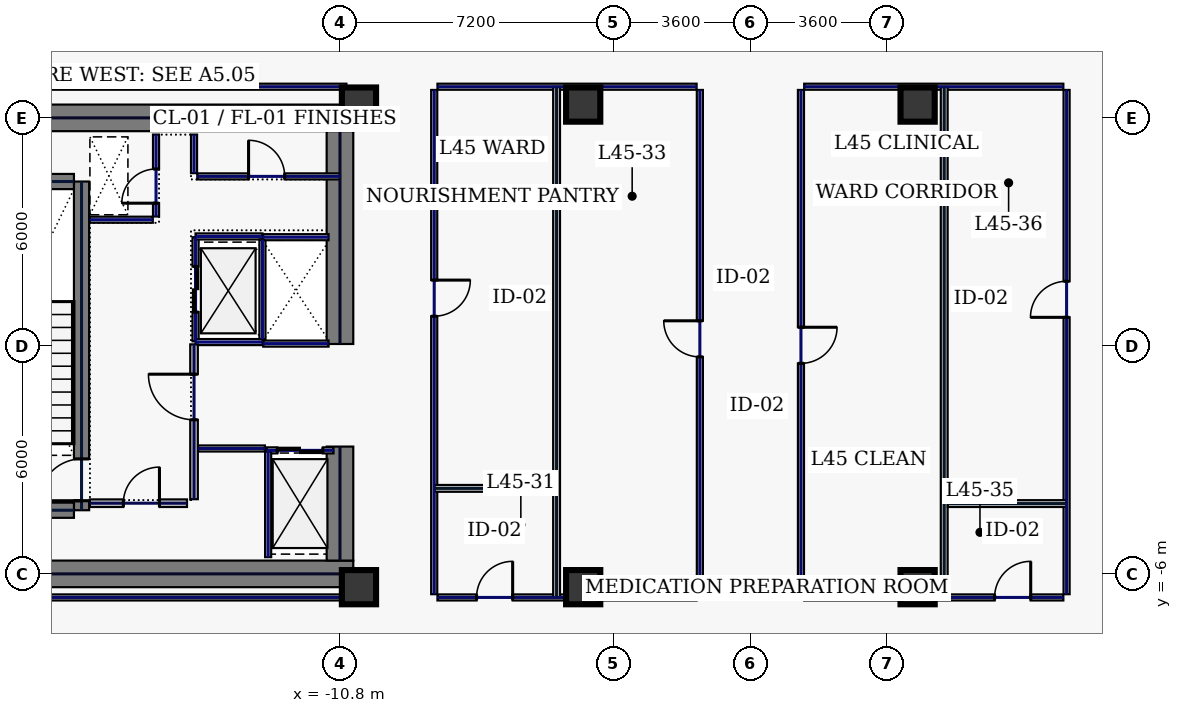
"""IFC4 building model, lengths in metres.
Left out: names, types, materials, properties, quantities, classifications, styles, units other than length and angle.
Written with IfcOpenShell. Run it as: python <this file> out.ifc"""

import sys

from ifc_helpers import new_model, si_unit, direction, frame, frame_2d, origin, origin_2d, place, context, subcontext, project, spatial, rectangle, hollow_rectangle, extrude, element, fill, save


model = new_model("IFC4")
c1 = context("Model", 3, precision=1e-05, world=origin(), true_north=direction((0.0, 1.0)))
c2 = subcontext(c1, "Body", "Model", "MODEL_VIEW")
j1 = project(units=[si_unit("LENGTHUNIT", "METRE"), si_unit("PLANEANGLEUNIT", "RADIAN")], contexts=[c1])
p1 = place(None, origin())
s1 = spatial("IfcSite", under=j1, at=p1, CompositionType="ELEMENT")
p2 = place(p1, origin())
s2 = spatial("IfcBuilding", under=s1, at=p2, CompositionType="ELEMENT")
p3 = place(p2, frame((0.0, 0.0, 196.2)))
s3 = spatial("IfcBuildingStorey", under=s2, at=p3, CompositionType="ELEMENT", Elevation=196.2)
for number, where, z_axis, x_axis in (
    (1, (-22.0, 6.0, 0.0), (0.0, 0.0, 1.0), (1.0, 0.0, 0.0)),
    (2, (-22.0, -6.0, 0.0), (0.0, 0.0, 1.0), (1.0, 0.0, 0.0)),
):
    element("IfcWall", number, at=place(p3, frame(where, z_axis=z_axis, x_axis=x_axis)), inside=s3, PredefinedType="SHEAR", context=c2, shape_type="SweptSolid", body=[
        extrude(rectangle(XDim=11.55, YDim=0.7, at=frame_2d((5.775, 0.0))), origin(), (0.0, 0.0, 1.0), 3.74),
    ])
p4 = place(p3, frame((-10.8, -5.65, 0.0), z_axis=(0.0, 0.0, 1.0), x_axis=(0.0, 1.0, 0.0)))
e3 = element("IfcWall", 3, at=p4, inside=s3, PredefinedType="SHEAR", context=c2, shape_type="SweptSolid", body=[
    extrude(rectangle(XDim=3.0, YDim=0.7, at=frame_2d((1.5, 0.0))), origin(), (0.0, 0.0, 1.0), 3.74),
])
p5 = place(p3, frame((-10.8, 0.05, 0.0), z_axis=(0.0, 0.0, 1.0), x_axis=(0.0, 1.0, 0.0)))
e4 = element("IfcWall", 4, at=p5, inside=s3, PredefinedType="SHEAR", context=c2, shape_type="SweptSolid", body=[
    extrude(rectangle(XDim=5.6, YDim=0.7, at=frame_2d((2.8, 0.0))), origin(), (0.0, 0.0, 1.0), 3.74),
])
p6 = place(p3, frame((-17.6, -4.325, 0.0), z_axis=(0.0, 0.0, 1.0), x_axis=(0.0, 1.0, 0.0)))
e5 = element("IfcWall", 5, at=p6, inside=s3, PredefinedType="SHEAR", context=c2, shape_type="SweptSolid", body=[
    extrude(rectangle(XDim=8.65, YDim=0.4, at=frame_2d((4.325, 0.0))), origin(), (0.0, 0.0, 1.0), 3.74),
])
p7 = place(p6, frame((0.25, 0.0, 0.0)))
e6 = element("IfcOpeningElement", 6, at=p7, cuts=e5, PredefinedType="OPENING", context=c2, shape_type="SweptSolid", body=[
    extrude(rectangle(XDim=1.1, YDim=2.2, at=frame_2d((0.55, 1.1))), frame((0.0, 0.21, 0.0), z_axis=(0.0, -1.0, 0.0), x_axis=(1.0, 0.0, 0.0)), (0.0, 0.0, 1.0), 0.42),
])
for number, where, z_axis, x_axis in (
    (7, (-21.2, -4.325, 0.0), (0.0, 0.0, 1.0), (1.0, 0.0, 0.0)),
    (8, (-21.2, 4.325, 0.0), (0.0, 0.0, 1.0), (1.0, 0.0, 0.0)),
):
    element("IfcWall", number, at=place(p3, frame(where, z_axis=z_axis, x_axis=x_axis)), inside=s3, PredefinedType="SHEAR", context=c2, shape_type="SweptSolid", body=[
        extrude(rectangle(XDim=3.4, YDim=0.4, at=frame_2d((1.7, 0.0))), origin(), (0.0, 0.0, 1.0), 3.74),
    ])
for number, where, z_axis, x_axis in (
    (9, (-10.3, -6.35, 0.0), (0.0, 0.0, 1.0), (1.0, 0.0, 0.0)),
    (10, (-10.3, 6.35, 0.0), (0.0, 0.0, 1.0), (1.0, 0.0, 0.0)),
    (11, (-4.4, -6.35, 0.0), (0.0, 0.0, 1.0), (1.0, 0.0, 0.0)),
    (12, (4.4, -6.35, 0.0), (0.0, 0.0, 1.0), (1.0, 0.0, 0.0)),
    (13, (-4.4, 6.35, 0.0), (0.0, 0.0, 1.0), (1.0, 0.0, 0.0)),
    (14, (4.4, 6.35, 0.0), (0.0, 0.0, 1.0), (1.0, 0.0, 0.0)),
):
    element("IfcColumn", number, at=place(p3, frame(where, z_axis=z_axis, x_axis=x_axis)), inside=s3, PredefinedType="COLUMN", context=c2, shape_type="SweptSolid", body=[
        extrude(hollow_rectangle(XDim=0.9, YDim=0.9, WallThickness=0.04, at=origin_2d()), origin(), (0.0, 0.0, 1.0), 3.74),
    ])
p8 = place(p3, frame((-14.6, 0.12, 0.0), z_axis=(0.0, 0.0, 1.0), x_axis=(0.0, 1.0, 0.0)))
e15 = element("IfcWall", 15, at=p8, inside=s3, PredefinedType="PARTITIONING", context=c2, shape_type="SweptSolid", body=[
    extrude(rectangle(XDim=2.74, YDim=0.16, at=frame_2d((1.37, 0.0))), origin(), (0.0, 0.0, 1.0), 3.74),
])
p9 = place(p8, frame((0.77, 0.0, 0.0)))
e16 = element("IfcOpeningElement", 16, at=p9, cuts=e15, PredefinedType="OPENING", context=c2, shape_type="SweptSolid", body=[
    extrude(rectangle(XDim=1.2, YDim=2.2, at=frame_2d((0.6, 1.1))), frame((0.0, 0.09, 0.0), z_axis=(0.0, -1.0, 0.0), x_axis=(1.0, 0.0, 0.0)), (0.0, 0.0, 1.0), 0.18),
])
for number, where, z_axis, x_axis in (
    (17, (-14.6, 0.1, 0.0), (0.0, 0.0, 1.0), (1.0, 0.0, 0.0)),
    (18, (-14.6, 2.88, 0.0), (0.0, 0.0, 1.0), (1.0, 0.0, 0.0)),
):
    element("IfcWall", number, at=place(p3, frame(where, z_axis=z_axis, x_axis=x_axis)), inside=s3, PredefinedType="PARTITIONING", context=c2, shape_type="SweptSolid", body=[
        extrude(rectangle(XDim=1.76, YDim=0.16, at=frame_2d((0.88, 0.0))), origin(), (0.0, 0.0, 1.0), 3.74),
    ])
p10 = place(p3, frame((-12.84, 0.18, 0.0), z_axis=(0.0, 0.0, 1.0), x_axis=(0.0, 1.0, 0.0)))
e19 = element("IfcWall", 19, at=p10, inside=s3, PredefinedType="PARTITIONING", context=c2, shape_type="SweptSolid", body=[
    extrude(rectangle(XDim=2.62, YDim=0.16, at=frame_2d((1.31, 0.0))), origin(), (0.0, 0.0, 1.0), 3.74),
])
p11 = place(p3, frame((-12.73, -2.75, 0.0), z_axis=(0.0, 0.0, 1.0), x_axis=(1.0, 0.0, 0.0)))
e20 = element("IfcWall", 20, at=p11, inside=s3, PredefinedType="PARTITIONING", context=c2, shape_type="SweptSolid", body=[
    extrude(rectangle(XDim=1.76, YDim=0.16, at=frame_2d((0.88, 0.0))), origin(), (0.0, 0.0, 1.0), 3.74),
])
p12 = place(p11, frame((0.28, 0.0, 0.0)))
e21 = element("IfcOpeningElement", 21, at=p12, cuts=e20, PredefinedType="OPENING", context=c2, shape_type="SweptSolid", body=[
    extrude(rectangle(XDim=1.2, YDim=2.2, at=frame_2d((0.6, 1.1))), frame((0.0, 0.09, 0.0), z_axis=(0.0, -1.0, 0.0), x_axis=(1.0, 0.0, 0.0)), (0.0, 0.0, 1.0), 0.18),
])
for number, where, z_axis, x_axis in (
    (22, (-12.82, 0.06, 0.0), (0.0, 0.0, 1.0), (1.0, 0.0, 0.0)),
    (23, (-12.82, 2.86, 0.0), (0.0, 0.0, 1.0), (1.0, 0.0, 0.0)),
):
    element("IfcWall", number, at=place(p3, frame(where, z_axis=z_axis, x_axis=x_axis)), inside=s3, PredefinedType="PARTITIONING", context=c2, shape_type="SweptSolid", body=[
        extrude(rectangle(XDim=1.72, YDim=0.16, at=frame_2d((0.86, 0.0))), origin(), (0.0, 0.0, 1.0), 3.74),
    ])
p13 = place(p3, frame((-15.64, 3.405, 0.0), z_axis=(0.0, 0.0, 1.0), x_axis=(0.0, 1.0, 0.0)))
e24 = element("IfcWall", 24, at=p13, inside=s3, PredefinedType="PARTITIONING", context=c2, shape_type="SweptSolid", body=[
    extrude(rectangle(XDim=2.155, YDim=0.16, at=frame_2d((1.078, 0.0))), origin(), (0.0, 0.0, 1.0), 3.74),
])
p14 = place(p13, frame((0.35, 0.0, 0.0)))
e25 = element("IfcOpeningElement", 25, at=p14, cuts=e24, PredefinedType="OPENING", context=c2, shape_type="SweptSolid", body=[
    extrude(rectangle(XDim=0.9, YDim=2.2, at=frame_2d((0.45, 1.1))), frame((0.0, 0.09, 0.0), z_axis=(0.0, -1.0, 0.0), x_axis=(1.0, 0.0, 0.0)), (0.0, 0.0, 1.0), 0.18),
])
p15 = place(p3, frame((-17.38, 3.32, 0.0), z_axis=(0.0, 0.0, 1.0), x_axis=(1.0, 0.0, 0.0)))
e26 = element("IfcWall", 26, at=p15, inside=s3, PredefinedType="PARTITIONING", context=c2, shape_type="SweptSolid", body=[
    extrude(rectangle(XDim=1.655, YDim=0.16, at=frame_2d((0.827, 0.0))), origin(), (0.0, 0.0, 1.0), 3.74),
])
p16 = place(p3, frame((-17.38, -4.14, 0.0), z_axis=(0.0, 0.0, 1.0), x_axis=(1.0, 0.0, 0.0)))
e27 = element("IfcWall", 27, at=p16, inside=s3, PredefinedType="SOLIDWALL", context=c2, shape_type="SweptSolid", body=[
    extrude(rectangle(XDim=2.555, YDim=0.2, at=frame_2d((1.277, 0.0))), origin(), (0.0, 0.0, 1.0), 3.74),
])
p17 = place(p16, frame((0.88, 0.0, 0.0)))
e28 = element("IfcOpeningElement", 28, at=p17, cuts=e27, PredefinedType="OPENING", context=c2, shape_type="SweptSolid", body=[
    extrude(rectangle(XDim=0.95, YDim=2.2, at=frame_2d((0.475, 1.1))), frame((0.0, 0.11, 0.0), z_axis=(0.0, -1.0, 0.0), x_axis=(1.0, 0.0, 0.0)), (0.0, 0.0, 1.0), 0.22),
])
p18 = place(p3, frame((-14.535, -2.7, 0.0), z_axis=(0.0, 0.0, 1.0), x_axis=(1.0, 0.0, 0.0)))
e29 = element("IfcWall", 29, at=p18, inside=s3, PredefinedType="PARTITIONING", context=c2, shape_type="SweptSolid", body=[
    extrude(rectangle(XDim=1.76, YDim=0.16, at=frame_2d((0.88, 0.0))), origin(), (0.0, 0.0, 1.0), 3.74),
])
p19 = place(p3, frame((-12.69, -5.56, 0.0), z_axis=(0.0, 0.0, 1.0), x_axis=(0.0, 1.0, 0.0)))
e30 = element("IfcWall", 30, at=p19, inside=s3, PredefinedType="PARTITIONING", context=c2, shape_type="SweptSolid", body=[
    extrude(rectangle(XDim=2.775, YDim=0.16, at=frame_2d((1.388, 0.0))), origin(), (0.0, 0.0, 1.0), 3.74),
])
p20 = place(p3, frame((-14.555, 4.46, 0.0), z_axis=(0.0, 0.0, 1.0), x_axis=(1.0, 0.0, 0.0)))
e31 = element("IfcWall", 31, at=p20, inside=s3, PredefinedType="PARTITIONING", context=c2, shape_type="SweptSolid", body=[
    extrude(rectangle(XDim=3.755, YDim=0.16, at=frame_2d((1.877, 0.0))), origin(), (0.0, 0.0, 1.0), 3.74),
])
p21 = place(p20, frame((1.35, 0.0, 0.0)))
e32 = element("IfcOpeningElement", 32, at=p21, cuts=e31, PredefinedType="OPENING", context=c2, shape_type="SweptSolid", body=[
    extrude(rectangle(XDim=0.95, YDim=2.2, at=frame_2d((0.475, 1.1))), frame((0.0, 0.09, 0.0), z_axis=(0.0, -1.0, 0.0), x_axis=(1.0, 0.0, 0.0)), (0.0, 0.0, 1.0), 0.18),
])
p22 = place(p3, frame((-14.64, 4.545, 0.0), z_axis=(0.0, 0.0, 1.0), x_axis=(0.0, 1.0, 0.0)))
e33 = element("IfcWall", 33, at=p22, inside=s3, PredefinedType="PARTITIONING", context=c2, shape_type="SweptSolid", body=[
    extrude(rectangle(XDim=1.015, YDim=0.16, at=frame_2d((0.508, 0.0))), origin(), (0.0, 0.0, 1.0), 3.74),
])
p23 = place(p3, frame((-14.64, -4.035, 0.0), z_axis=(0.0, 0.0, 1.0), x_axis=(0.0, 1.0, 0.0)))
e34 = element("IfcWall", 34, at=p23, inside=s3, PredefinedType="SOLIDWALL", context=c2, shape_type="SweptSolid", body=[
    extrude(rectangle(XDim=4.075, YDim=0.2, at=frame_2d((2.038, 0.0))), origin(), (0.0, 0.0, 1.0), 3.74),
])
p24 = place(p23, frame((2.09, 0.0, 0.0)))
e35 = element("IfcOpeningElement", 35, at=p24, cuts=e34, PredefinedType="OPENING", context=c2, shape_type="SweptSolid", body=[
    extrude(rectangle(XDim=1.2, YDim=2.2, at=frame_2d((0.6, 1.1))), frame((0.0, 0.11, 0.0), z_axis=(0.0, -1.0, 0.0), x_axis=(1.0, 0.0, 0.0)), (0.0, 0.0, 1.0), 0.22),
])
for number, where, z_axis, x_axis in (
    (36, (-24.965, -6.62, 0.0), (0.0, 0.0, 1.0), (1.0, 0.0, 0.0)),
    (37, (-10.63, 6.82, 0.0), (0.0, 0.0, 1.0), (-1.0, 0.0, 0.0)),
):
    element("IfcWall", number, at=place(p3, frame(where, z_axis=z_axis, x_axis=x_axis)), inside=s3, PredefinedType="PARTITIONING", context=c2, shape_type="SweptSolid", body=[
        extrude(rectangle(XDim=14.335, YDim=0.16, at=frame_2d((7.167, 0.0))), origin(), (0.0, 0.0, 1.0), 3.74),
    ])
p25 = place(p3, frame((8.235, 6.82, 0.0), z_axis=(0.0, 0.0, 1.0), x_axis=(-1.0, 0.0, 0.0)))
e38 = element("IfcWall", 38, at=p25, inside=s3, PredefinedType="PARTITIONING", context=c2, shape_type="SweptSolid", body=[
    extrude(rectangle(XDim=6.82, YDim=0.16, at=frame_2d((3.41, 0.0))), origin(), (0.0, 0.0, 1.0), 3.74),
])
p26 = place(p3, frame((1.33, 6.735, 0.0), z_axis=(0.0, 0.0, 1.0), x_axis=(0.0, -1.0, 0.0)))
e39 = element("IfcWall", 39, at=p26, inside=s3, PredefinedType="PARTITIONING", context=c2, shape_type="SweptSolid", body=[
    extrude(rectangle(XDim=13.27, YDim=0.16, at=frame_2d((6.635, 0.0))), origin(), (0.0, 0.0, 1.0), 3.74),
])
p27 = place(p26, frame((6.245, 0.0, 0.0)))
e40 = element("IfcOpeningElement", 40, at=p27, cuts=e39, PredefinedType="OPENING", context=c2, shape_type="SweptSolid", body=[
    extrude(rectangle(XDim=0.95, YDim=2.2, at=frame_2d((0.475, 1.1))), frame((0.0, 0.09, 0.0), z_axis=(0.0, -1.0, 0.0), x_axis=(1.0, 0.0, 0.0)), (0.0, 0.0, 1.0), 0.18),
])
p28 = place(p3, frame((1.415, -6.62, 0.0), z_axis=(0.0, 0.0, 1.0), x_axis=(1.0, 0.0, 0.0)))
e41 = element("IfcWall", 41, at=p28, inside=s3, PredefinedType="PARTITIONING", context=c2, shape_type="SweptSolid", body=[
    extrude(rectangle(XDim=6.82, YDim=0.16, at=frame_2d((3.41, 0.0))), origin(), (0.0, 0.0, 1.0), 3.74),
])
p29 = place(p28, frame((5.011, 0.0, 0.0)))
e42 = element("IfcOpeningElement", 42, at=p29, cuts=e41, PredefinedType="OPENING", context=c2, shape_type="SweptSolid", body=[
    extrude(rectangle(XDim=0.95, YDim=2.2, at=frame_2d((0.475, 1.1))), frame((0.0, 0.09, 0.0), z_axis=(0.0, -1.0, 0.0), x_axis=(1.0, 0.0, 0.0)), (0.0, 0.0, 1.0), 0.18),
])
p30 = place(p3, frame((8.32, -6.535, 0.0), z_axis=(0.0, 0.0, 1.0), x_axis=(0.0, 1.0, 0.0)))
e43 = element("IfcWall", 43, at=p30, inside=s3, PredefinedType="PARTITIONING", context=c2, shape_type="SweptSolid", body=[
    extrude(rectangle(XDim=13.27, YDim=0.16, at=frame_2d((6.635, 0.0))), origin(), (0.0, 0.0, 1.0), 3.74),
])
p31 = place(p30, frame((7.286, 0.0, 0.0)))
e44 = element("IfcOpeningElement", 44, at=p31, cuts=e43, PredefinedType="OPENING", context=c2, shape_type="SweptSolid", body=[
    extrude(rectangle(XDim=0.95, YDim=2.2, at=frame_2d((0.475, 1.1))), frame((0.0, 0.09, 0.0), z_axis=(0.0, -1.0, 0.0), x_axis=(1.0, 0.0, 0.0)), (0.0, 0.0, 1.0), 0.18),
])
p32 = place(p3, frame((-1.33, -6.535, 0.0), z_axis=(0.0, 0.0, 1.0), x_axis=(0.0, 1.0, 0.0)))
e45 = element("IfcWall", 45, at=p32, inside=s3, PredefinedType="PARTITIONING", context=c2, shape_type="SweptSolid", body=[
    extrude(rectangle(XDim=13.27, YDim=0.16, at=frame_2d((6.635, 0.0))), origin(), (0.0, 0.0, 1.0), 3.74),
])
p33 = place(p32, frame((6.245, 0.0, 0.0)))
e46 = element("IfcOpeningElement", 46, at=p33, cuts=e45, PredefinedType="OPENING", context=c2, shape_type="SweptSolid", body=[
    extrude(rectangle(XDim=0.95, YDim=2.2, at=frame_2d((0.475, 1.1))), frame((0.0, 0.09, 0.0), z_axis=(0.0, -1.0, 0.0), x_axis=(1.0, 0.0, 0.0)), (0.0, 0.0, 1.0), 0.18),
])
p34 = place(p3, frame((-1.415, 6.82, 0.0), z_axis=(0.0, 0.0, 1.0), x_axis=(-1.0, 0.0, 0.0)))
e47 = element("IfcWall", 47, at=p34, inside=s3, PredefinedType="PARTITIONING", context=c2, shape_type="SweptSolid", body=[
    extrude(rectangle(XDim=6.82, YDim=0.16, at=frame_2d((3.41, 0.0))), origin(), (0.0, 0.0, 1.0), 3.74),
])
p35 = place(p3, frame((-8.32, 6.735, 0.0), z_axis=(0.0, 0.0, 1.0), x_axis=(0.0, -1.0, 0.0)))
e48 = element("IfcWall", 48, at=p35, inside=s3, PredefinedType="PARTITIONING", context=c2, shape_type="SweptSolid", body=[
    extrude(rectangle(XDim=13.27, YDim=0.16, at=frame_2d((6.635, 0.0))), origin(), (0.0, 0.0, 1.0), 3.74),
])
p36 = place(p35, frame((5.004, 0.0, 0.0)))
e49 = element("IfcOpeningElement", 49, at=p36, cuts=e48, PredefinedType="OPENING", context=c2, shape_type="SweptSolid", body=[
    extrude(rectangle(XDim=0.95, YDim=2.2, at=frame_2d((0.475, 1.1))), frame((0.0, 0.09, 0.0), z_axis=(0.0, -1.0, 0.0), x_axis=(1.0, 0.0, 0.0)), (0.0, 0.0, 1.0), 0.18),
])
p37 = place(p3, frame((-8.235, -6.62, 0.0), z_axis=(0.0, 0.0, 1.0), x_axis=(1.0, 0.0, 0.0)))
e50 = element("IfcWall", 50, at=p37, inside=s3, PredefinedType="PARTITIONING", context=c2, shape_type="SweptSolid", body=[
    extrude(rectangle(XDim=6.82, YDim=0.16, at=frame_2d((3.41, 0.0))), origin(), (0.0, 0.0, 1.0), 3.74),
])
p38 = place(p37, frame((1.029, 0.0, 0.0)))
e51 = element("IfcOpeningElement", 51, at=p38, cuts=e50, PredefinedType="OPENING", context=c2, shape_type="SweptSolid", body=[
    extrude(rectangle(XDim=0.95, YDim=2.2, at=frame_2d((0.475, 1.1))), frame((0.0, 0.09, 0.0), z_axis=(0.0, -1.0, 0.0), x_axis=(1.0, 0.0, 0.0)), (0.0, 0.0, 1.0), 0.18),
])
for number, where, z_axis, x_axis in (
    (52, (-5.1, -6.615, 0.0), (0.0, 0.0, 1.0), (0.0, 1.0, 0.0)),
    (53, (5.1, -6.615, 0.0), (0.0, 0.0, 1.0), (0.0, 1.0, 0.0)),
):
    element("IfcWall", number, at=place(p3, frame(where, z_axis=z_axis, x_axis=x_axis)), inside=s3, PredefinedType="PARTITIONING", context=c2, shape_type="SweptSolid", body=[
        extrude(rectangle(XDim=13.43, YDim=0.18, at=frame_2d((6.715, 0.0))), origin(), (0.0, 0.0, 1.0), 3.74),
    ])
for number, where, z_axis, x_axis in (
    (54, (-8.315, -3.75, 0.0), (0.0, 0.0, 1.0), (1.0, 0.0, 0.0)),
    (55, (5.195, -4.15, 0.0), (0.0, 0.0, 1.0), (1.0, 0.0, 0.0)),
):
    element("IfcWall", number, at=place(p3, frame(where, z_axis=z_axis, x_axis=x_axis)), inside=s3, PredefinedType="PARTITIONING", context=c2, shape_type="SweptSolid", body=[
        extrude(rectangle(XDim=3.12, YDim=0.18, at=frame_2d((1.56, 0.0))), origin(), (0.0, 0.0, 1.0), 3.74),
    ])
p39 = place(p7, origin())
e56 = element("IfcDoor", 56, at=p39, inside=s3, OperationType="SINGLE_SWING_LEFT", PredefinedType="DOOR", context=c2, shape_type="SweptSolid", body=[
    extrude(rectangle(XDim=1.1, YDim=2.2, at=frame_2d((0.55, 1.1))), frame((0.0, 0.025, 0.0), z_axis=(0.0, -1.0, 0.0), x_axis=(1.0, 0.0, 0.0)), (0.0, 0.0, 1.0), 0.05),
])
fill(e6, e56)
p40 = place(p9, origin())
e57 = element("IfcDoor", 57, at=p40, inside=s3, OperationType="SLIDING_TO_LEFT", PredefinedType="DOOR", context=c2, shape_type="SweptSolid", body=[
    extrude(rectangle(XDim=1.2, YDim=2.2, at=frame_2d((0.6, 1.1))), frame((0.0, 0.025, 0.0), z_axis=(0.0, -1.0, 0.0), x_axis=(1.0, 0.0, 0.0)), (0.0, 0.0, 1.0), 0.05),
])
fill(e16, e57)
p41 = place(p12, origin())
e58 = element("IfcDoor", 58, at=p41, inside=s3, OperationType="SLIDING_TO_LEFT", PredefinedType="DOOR", context=c2, shape_type="SweptSolid", body=[
    extrude(rectangle(XDim=1.2, YDim=2.2, at=frame_2d((0.6, 1.1))), frame((0.0, 0.025, 0.0), z_axis=(0.0, -1.0, 0.0), x_axis=(1.0, 0.0, 0.0)), (0.0, 0.0, 1.0), 0.05),
])
fill(e21, e58)
p42 = place(p14, origin())
e59 = element("IfcDoor", 59, at=p42, inside=s3, OperationType="SINGLE_SWING_LEFT", PredefinedType="DOOR", context=c2, shape_type="SweptSolid", body=[
    extrude(rectangle(XDim=0.9, YDim=2.2, at=frame_2d((0.45, 1.1))), frame((0.0, 0.025, 0.0), z_axis=(0.0, -1.0, 0.0), x_axis=(1.0, 0.0, 0.0)), (0.0, 0.0, 1.0), 0.05),
])
fill(e25, e59)
p43 = place(p17, origin())
e60 = element("IfcDoor", 60, at=p43, inside=s3, OperationType="SINGLE_SWING_RIGHT", PredefinedType="DOOR", context=c2, shape_type="SweptSolid", body=[
    extrude(rectangle(XDim=0.95, YDim=2.2, at=frame_2d((0.475, 1.1))), frame((0.0, 0.025, 0.0), z_axis=(0.0, -1.0, 0.0), x_axis=(1.0, 0.0, 0.0)), (0.0, 0.0, 1.0), 0.05),
])
fill(e28, e60)
p44 = place(p21, origin())
e61 = element("IfcDoor", 61, at=p44, inside=s3, OperationType="SINGLE_SWING_LEFT", PredefinedType="DOOR", context=c2, shape_type="SweptSolid", body=[
    extrude(rectangle(XDim=0.95, YDim=2.2, at=frame_2d((0.475, 1.1))), frame((0.0, 0.025, 0.0), z_axis=(0.0, -1.0, 0.0), x_axis=(1.0, 0.0, 0.0)), (0.0, 0.0, 1.0), 0.05),
])
fill(e32, e61)
p45 = place(p24, origin())
e62 = element("IfcDoor", 62, at=p45, inside=s3, OperationType="SINGLE_SWING_RIGHT", PredefinedType="DOOR", context=c2, shape_type="SweptSolid", body=[
    extrude(rectangle(XDim=1.2, YDim=2.2, at=frame_2d((0.6, 1.1))), frame((0.0, 0.025, 0.0), z_axis=(0.0, -1.0, 0.0), x_axis=(1.0, 0.0, 0.0)), (0.0, 0.0, 1.0), 0.05),
])
fill(e35, e62)
p46 = place(p38, origin())
e63 = element("IfcDoor", 63, at=p46, inside=s3, OperationType="SINGLE_SWING_RIGHT", PredefinedType="DOOR", context=c2, shape_type="SweptSolid", body=[
    extrude(rectangle(XDim=0.95, YDim=2.2, at=frame_2d((0.475, 1.1))), frame((0.0, 0.025, 0.0), z_axis=(0.0, -1.0, 0.0), x_axis=(1.0, 0.0, 0.0)), (0.0, 0.0, 1.0), 0.05),
])
fill(e51, e63)
p47 = place(p36, origin())
e64 = element("IfcDoor", 64, at=p47, inside=s3, OperationType="SINGLE_SWING_LEFT", PredefinedType="DOOR", context=c2, shape_type="SweptSolid", body=[
    extrude(rectangle(XDim=0.95, YDim=2.2, at=frame_2d((0.475, 1.1))), frame((0.0, 0.025, 0.0), z_axis=(0.0, -1.0, 0.0), x_axis=(1.0, 0.0, 0.0)), (0.0, 0.0, 1.0), 0.05),
])
fill(e49, e64)
p48 = place(p33, origin())
e65 = element("IfcDoor", 65, at=p48, inside=s3, OperationType="SINGLE_SWING_RIGHT", PredefinedType="DOOR", context=c2, shape_type="SweptSolid", body=[
    extrude(rectangle(XDim=0.95, YDim=2.2, at=frame_2d((0.475, 1.1))), frame((0.0, 0.025, 0.0), z_axis=(0.0, -1.0, 0.0), x_axis=(1.0, 0.0, 0.0)), (0.0, 0.0, 1.0), 0.05),
])
fill(e46, e65)
p49 = place(p27, origin())
e66 = element("IfcDoor", 66, at=p49, inside=s3, OperationType="SINGLE_SWING_LEFT", PredefinedType="DOOR", context=c2, shape_type="SweptSolid", body=[
    extrude(rectangle(XDim=0.95, YDim=2.2, at=frame_2d((0.475, 1.1))), frame((0.0, 0.025, 0.0), z_axis=(0.0, -1.0, 0.0), x_axis=(1.0, 0.0, 0.0)), (0.0, 0.0, 1.0), 0.05),
])
fill(e40, e66)
p50 = place(p29, origin())
e67 = element("IfcDoor", 67, at=p50, inside=s3, OperationType="SINGLE_SWING_RIGHT", PredefinedType="DOOR", context=c2, shape_type="SweptSolid", body=[
    extrude(rectangle(XDim=0.95, YDim=2.2, at=frame_2d((0.475, 1.1))), frame((0.0, 0.025, 0.0), z_axis=(0.0, -1.0, 0.0), x_axis=(1.0, 0.0, 0.0)), (0.0, 0.0, 1.0), 0.05),
])
fill(e42, e67)
p51 = place(p31, origin())
e68 = element("IfcDoor", 68, at=p51, inside=s3, OperationType="SINGLE_SWING_LEFT", PredefinedType="DOOR", context=c2, shape_type="SweptSolid", body=[
    extrude(rectangle(XDim=0.95, YDim=2.2, at=frame_2d((0.475, 1.1))), frame((0.0, 0.025, 0.0), z_axis=(0.0, -1.0, 0.0), x_axis=(1.0, 0.0, 0.0)), (0.0, 0.0, 1.0), 0.05),
])
fill(e44, e68)
save(model, sys.argv[1])
